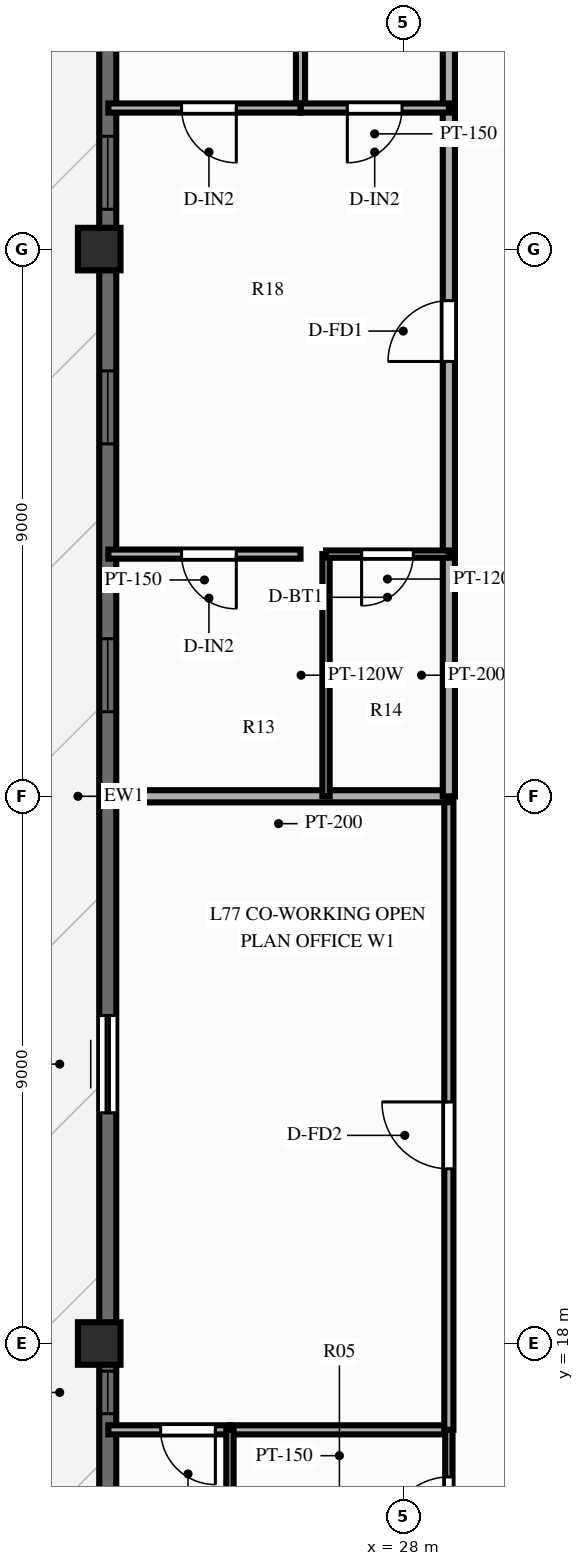
"""IFC4 building model, lengths in metres.
Left out: names, types, materials, properties, quantities, classifications, styles, units other than length and angle.
Written with IfcOpenShell. Run it as: python <this file> out.ifc"""

import sys

from ifc_helpers import new_model, si_unit, direction, frame, frame_2d, origin, origin_2d, place, context, subcontext, project, spatial, rectangle, extrude, source, transform, mapped, element, fill, save


model = new_model("IFC4")
c1 = context("Model", 3, precision=1e-05, world=origin(), true_north=direction((0.0, 1.0)))
c2 = subcontext(c1, "Body", "Model", "MODEL_VIEW")
j1 = project(units=[si_unit("LENGTHUNIT", "METRE"), si_unit("PLANEANGLEUNIT", "RADIAN")], contexts=[c1])
p1 = place(None, origin())
s1 = spatial("IfcSite", under=j1, at=p1, CompositionType="ELEMENT")
p2 = place(p1, origin())
s2 = spatial("IfcBuilding", under=s1, at=p2, CompositionType="ELEMENT")
p3 = place(p2, frame((0.0, 0.0, 249.0)))
s3 = spatial("IfcBuildingStorey", under=s2, at=p3, CompositionType="ELEMENT", Elevation=249.0)
m1 = source(origin(), c2, "Body", "SweptSolid", [
    extrude(rectangle(XDim=0.7, YDim=0.7, at=origin_2d()), origin(), (0.0, 0.0, 1.0), 3.2),
])
for number, where, z_axis, x_axis in (
    (1, (23.0, 36.0, 0.0), (0.0, 0.0, 1.0), (1.0, 0.0, 0.0)),
    (2, (23.0, 18.0, 0.0), (0.0, 0.0, 1.0), (1.0, 0.0, 0.0)),
):
    element("IfcColumn", number, at=place(p3, frame(where, z_axis=z_axis, x_axis=x_axis)), inside=s3, PredefinedType="COLUMN", context=c2, shape_type="MappedRepresentation", body=[
        mapped(m1, transform((0.0, 0.0, 0.0), scale=1.0)),
    ])
p4 = place(p3, frame((23.14, 11.5, 0.0), z_axis=(0.0, 0.0, 1.0), x_axis=(0.0, 1.0, 0.0)))
e3 = element("IfcWall", 3, at=p4, inside=s3, PredefinedType="SOLIDWALL", context=c2, shape_type="SweptSolid", body=[
    extrude(rectangle(XDim=31.0, YDim=0.28, at=frame_2d((15.5, 0.0))), origin(), (0.0, 0.0, 1.0), 2.48),
])
p5 = place(p4, frame((2.035, 0.0, 0.25)))
e4 = element("IfcOpeningElement", 4, at=p5, cuts=e3, PredefinedType="OPENING", context=c2, shape_type="SweptSolid", body=[
    extrude(rectangle(XDim=1.2, YDim=1.5, at=frame_2d((0.6, 0.75))), frame((0.0, 0.152, 0.0), z_axis=(0.0, -1.0, 0.0), x_axis=(1.0, 0.0, 0.0)), (0.0, 0.0, 1.0), 0.304),
])
p6 = place(p4, frame((5.345, 0.0, 0.25)))
e5 = element("IfcOpeningElement", 5, at=p6, cuts=e3, PredefinedType="OPENING", context=c2, shape_type="SweptSolid", body=[
    extrude(rectangle(XDim=0.7, YDim=1.5, at=frame_2d((0.35, 0.75))), frame((0.0, 0.152, 0.0), z_axis=(0.0, -1.0, 0.0), x_axis=(1.0, 0.0, 0.0)), (0.0, 0.0, 1.0), 0.304),
])
p7 = place(p4, frame((10.295, 0.0, 0.0)))
e6 = element("IfcOpeningElement", 6, at=p7, cuts=e3, PredefinedType="OPENING", context=c2, shape_type="SweptSolid", body=[
    extrude(rectangle(XDim=1.6, YDim=2.15, at=frame_2d((0.8, 1.075))), frame((0.0, 0.152, 0.0), z_axis=(0.0, -1.0, 0.0), x_axis=(1.0, 0.0, 0.0)), (0.0, 0.0, 1.0), 0.304),
])
p8 = place(p4, frame((16.892, 0.0, 0.25)))
e7 = element("IfcOpeningElement", 7, at=p8, cuts=e3, PredefinedType="OPENING", context=c2, shape_type="SweptSolid", body=[
    extrude(rectangle(XDim=1.2, YDim=1.5, at=frame_2d((0.6, 0.75))), frame((0.0, 0.152, 0.0), z_axis=(0.0, -1.0, 0.0), x_axis=(1.0, 0.0, 0.0)), (0.0, 0.0, 1.0), 0.304),
])
p9 = place(p4, frame((21.297, 0.0, 0.25)))
e8 = element("IfcOpeningElement", 8, at=p9, cuts=e3, PredefinedType="OPENING", context=c2, shape_type="SweptSolid", body=[
    extrude(rectangle(XDim=1.2, YDim=1.5, at=frame_2d((0.6, 0.75))), frame((0.0, 0.152, 0.0), z_axis=(0.0, -1.0, 0.0), x_axis=(1.0, 0.0, 0.0)), (0.0, 0.0, 1.0), 0.304),
])
p10 = place(p4, frame((25.155, 0.0, 0.25)))
e9 = element("IfcOpeningElement", 9, at=p10, cuts=e3, PredefinedType="OPENING", context=c2, shape_type="SweptSolid", body=[
    extrude(rectangle(XDim=1.2, YDim=1.5, at=frame_2d((0.6, 0.75))), frame((0.0, 0.152, 0.0), z_axis=(0.0, -1.0, 0.0), x_axis=(1.0, 0.0, 0.0)), (0.0, 0.0, 1.0), 0.304),
])
p11 = place(p4, frame((28.215, 0.0, 0.25)))
e10 = element("IfcOpeningElement", 10, at=p11, cuts=e3, PredefinedType="OPENING", context=c2, shape_type="SweptSolid", body=[
    extrude(rectangle(XDim=1.2, YDim=1.5, at=frame_2d((0.6, 0.75))), frame((0.0, 0.152, 0.0), z_axis=(0.0, -1.0, 0.0), x_axis=(1.0, 0.0, 0.0)), (0.0, 0.0, 1.0), 0.304),
])
p12 = place(p3, frame((28.75, 16.58, 0.0), z_axis=(0.0, 0.0, 1.0), x_axis=(-1.0, 0.0, 0.0)))
e11 = element("IfcWall", 11, at=p12, inside=s3, PredefinedType="PARTITIONING", context=c2, shape_type="SweptSolid", body=[
    extrude(rectangle(XDim=3.6, YDim=0.15, at=frame_2d((1.8, 0.0))), origin(), (0.0, 0.0, 1.0), 2.88),
])
p13 = place(p3, frame((25.15, 16.58, 0.0), z_axis=(0.0, 0.0, 1.0), x_axis=(-1.0, 0.0, 0.0)))
e12 = element("IfcWall", 12, at=p13, inside=s3, PredefinedType="PARTITIONING", context=c2, shape_type="SweptSolid", body=[
    extrude(rectangle(XDim=2.0, YDim=0.15, at=frame_2d((1.0, 0.0))), origin(), (0.0, 0.0, 1.0), 2.88),
])
p14 = place(p13, frame((0.24, 0.0, 0.0)))
e13 = element("IfcOpeningElement", 13, at=p14, cuts=e12, PredefinedType="OPENING", context=c2, shape_type="SweptSolid", body=[
    extrude(rectangle(XDim=0.9, YDim=2.1, at=frame_2d((0.45, 1.05))), frame((0.0, 0.087, 0.0), z_axis=(0.0, -1.0, 0.0), x_axis=(1.0, 0.0, 0.0)), (0.0, 0.0, 1.0), 0.174),
])
p15 = place(p3, frame((25.15, 11.68, 0.0), z_axis=(0.0, 0.0, 1.0), x_axis=(0.0, 1.0, 0.0)))
e14 = element("IfcWall", 14, at=p15, inside=s3, PredefinedType="PARTITIONING", context=c2, shape_type="SweptSolid", body=[
    extrude(rectangle(XDim=4.9, YDim=0.12, at=frame_2d((2.45, 0.0))), origin(), (0.0, 0.0, 1.0), 2.88),
])
p16 = place(p3, frame((28.75, 14.03, 0.0), z_axis=(0.0, 0.0, 1.0), x_axis=(0.0, 1.0, 0.0)))
e15 = element("IfcWall", 15, at=p16, inside=s3, PredefinedType="PARTITIONING", context=c2, shape_type="SweptSolid", body=[
    extrude(rectangle(XDim=2.55, YDim=0.12, at=frame_2d((1.275, 0.0))), origin(), (0.0, 0.0, 1.0), 2.88),
])
p17 = place(p16, frame((0.775, 0.0, 0.0)))
e16 = element("IfcOpeningElement", 16, at=p17, cuts=e15, PredefinedType="OPENING", context=c2, shape_type="SweptSolid", body=[
    extrude(rectangle(XDim=1.0, YDim=2.1, at=frame_2d((0.5, 1.05))), frame((0.0, 0.072, 0.0), z_axis=(0.0, -1.0, 0.0), x_axis=(1.0, 0.0, 0.0)), (0.0, 0.0, 1.0), 0.144),
])
p18 = place(p3, frame((28.75, 16.58, 0.0), z_axis=(0.0, 0.0, 1.0), x_axis=(0.0, 1.0, 0.0)))
e17 = element("IfcWall", 17, at=p18, inside=s3, PredefinedType="PARTITIONING", context=c2, shape_type="SweptSolid", body=[
    extrude(rectangle(XDim=10.42, YDim=0.15, at=frame_2d((5.21, 0.0))), origin(), (0.0, 0.0, 1.0), 2.88),
])
p19 = place(p18, frame((4.293, 0.0, 0.0)))
e18 = element("IfcOpeningElement", 18, at=p19, cuts=e17, PredefinedType="OPENING", context=c2, shape_type="SweptSolid", body=[
    extrude(rectangle(XDim=1.1, YDim=2.15, at=frame_2d((0.55, 1.075))), frame((0.0, 0.087, 0.0), z_axis=(0.0, -1.0, 0.0), x_axis=(1.0, 0.0, 0.0)), (0.0, 0.0, 1.0), 0.174),
])
p20 = place(p3, frame((28.75, 27.0, 0.0), z_axis=(0.0, 0.0, 1.0), x_axis=(-1.0, 0.0, 0.0)))
e19 = element("IfcWall", 19, at=p20, inside=s3, PredefinedType="PARTITIONING", context=c2, shape_type="SweptSolid", body=[
    extrude(rectangle(XDim=5.6, YDim=0.2, at=frame_2d((2.8, 0.0))), origin(), (0.0, 0.0, 1.0), 2.88),
])
p21 = place(p3, frame((28.75, 27.0, 0.0), z_axis=(0.0, 0.0, 1.0), x_axis=(0.0, 1.0, 0.0)))
e20 = element("IfcWall", 20, at=p21, inside=s3, PredefinedType="PARTITIONING", context=c2, shape_type="SweptSolid", body=[
    extrude(rectangle(XDim=3.983, YDim=0.2, at=frame_2d((1.992, 0.0))), origin(), (0.0, 0.0, 1.0), 2.88),
])
p22 = place(p3, frame((28.75, 30.983, 0.0), z_axis=(0.0, 0.0, 1.0), x_axis=(0.0, 1.0, 0.0)))
e21 = element("IfcWall", 21, at=p22, inside=s3, PredefinedType="PARTITIONING", context=c2, shape_type="SweptSolid", body=[
    extrude(rectangle(XDim=7.337, YDim=0.2, at=frame_2d((3.668, 0.0))), origin(), (0.0, 0.0, 1.0), 2.88),
])
p23 = place(p22, frame((3.168, 0.0, 0.0)))
e22 = element("IfcOpeningElement", 22, at=p23, cuts=e21, PredefinedType="OPENING", context=c2, shape_type="SweptSolid", body=[
    extrude(rectangle(XDim=1.0, YDim=2.15, at=frame_2d((0.5, 1.075))), frame((0.0, 0.112, 0.0), z_axis=(0.0, -1.0, 0.0), x_axis=(1.0, 0.0, 0.0)), (0.0, 0.0, 1.0), 0.224),
])
p24 = place(p3, frame((28.75, 38.32, 0.0), z_axis=(0.0, 0.0, 1.0), x_axis=(0.0, 1.0, 0.0)))
e23 = element("IfcWall", 23, at=p24, inside=s3, PredefinedType="PARTITIONING", context=c2, shape_type="SweptSolid", body=[
    extrude(rectangle(XDim=4.0, YDim=0.2, at=frame_2d((2.0, 0.0))), origin(), (0.0, 0.0, 1.0), 2.88),
])
p25 = place(p3, frame((26.73, 27.0, 0.0), z_axis=(0.0, 0.0, 1.0), x_axis=(0.0, 1.0, 0.0)))
e24 = element("IfcWall", 24, at=p25, inside=s3, PredefinedType="PARTITIONING", context=c2, shape_type="SweptSolid", body=[
    extrude(rectangle(XDim=3.983, YDim=0.12, at=frame_2d((1.992, 0.0))), origin(), (0.0, 0.0, 1.0), 2.59),
])
p26 = place(p3, frame((26.31, 38.32, 0.0), z_axis=(0.0, 0.0, 1.0), x_axis=(0.0, 1.0, 0.0)))
e25 = element("IfcWall", 25, at=p26, inside=s3, PredefinedType="PARTITIONING", context=c2, shape_type="SweptSolid", body=[
    extrude(rectangle(XDim=4.0, YDim=0.15, at=frame_2d((2.0, 0.0))), origin(), (0.0, 0.0, 1.0), 2.88),
])
p27 = place(p3, frame((28.75, 30.983, 0.0), z_axis=(0.0, 0.0, 1.0), x_axis=(-1.0, 0.0, 0.0)))
e26 = element("IfcWall", 26, at=p27, inside=s3, PredefinedType="PARTITIONING", context=c2, shape_type="SweptSolid", body=[
    extrude(rectangle(XDim=2.02, YDim=0.12, at=frame_2d((1.01, 0.0))), origin(), (0.0, 0.0, 1.0), 2.88),
])
p28 = place(p27, frame((0.585, 0.0, 0.0)))
e27 = element("IfcOpeningElement", 27, at=p28, cuts=e26, PredefinedType="OPENING", context=c2, shape_type="SweptSolid", body=[
    extrude(rectangle(XDim=0.85, YDim=2.05, at=frame_2d((0.425, 1.025))), frame((0.0, 0.072, 0.0), z_axis=(0.0, -1.0, 0.0), x_axis=(1.0, 0.0, 0.0)), (0.0, 0.0, 1.0), 0.144),
])
p29 = place(p3, frame((26.31, 30.983, 0.0), z_axis=(0.0, 0.0, 1.0), x_axis=(-1.0, 0.0, 0.0)))
e28 = element("IfcWall", 28, at=p29, inside=s3, PredefinedType="PARTITIONING", context=c2, shape_type="SweptSolid", body=[
    extrude(rectangle(XDim=3.16, YDim=0.15, at=frame_2d((1.58, 0.0))), origin(), (0.0, 0.0, 1.0), 2.88),
])
p30 = place(p29, frame((1.056, 0.0, 0.0)))
e29 = element("IfcOpeningElement", 29, at=p30, cuts=e28, PredefinedType="OPENING", context=c2, shape_type="SweptSolid", body=[
    extrude(rectangle(XDim=0.9, YDim=2.1, at=frame_2d((0.45, 1.05))), frame((0.0, 0.087, 0.0), z_axis=(0.0, -1.0, 0.0), x_axis=(1.0, 0.0, 0.0)), (0.0, 0.0, 1.0), 0.174),
])
p31 = place(p3, frame((28.75, 38.32, 0.0), z_axis=(0.0, 0.0, 1.0), x_axis=(-1.0, 0.0, 0.0)))
e30 = element("IfcWall", 30, at=p31, inside=s3, PredefinedType="PARTITIONING", context=c2, shape_type="SweptSolid", body=[
    extrude(rectangle(XDim=2.44, YDim=0.15, at=frame_2d((1.22, 0.0))), origin(), (0.0, 0.0, 1.0), 2.88),
])
p32 = place(p31, frame((0.77, 0.0, 0.0)))
e31 = element("IfcOpeningElement", 31, at=p32, cuts=e30, PredefinedType="OPENING", context=c2, shape_type="SweptSolid", body=[
    extrude(rectangle(XDim=0.9, YDim=2.1, at=frame_2d((0.45, 1.05))), frame((0.0, 0.087, 0.0), z_axis=(0.0, -1.0, 0.0), x_axis=(1.0, 0.0, 0.0)), (0.0, 0.0, 1.0), 0.174),
])
p33 = place(p3, frame((26.31, 38.32, 0.0), z_axis=(0.0, 0.0, 1.0), x_axis=(-1.0, 0.0, 0.0)))
e32 = element("IfcWall", 32, at=p33, inside=s3, PredefinedType="PARTITIONING", context=c2, shape_type="SweptSolid", body=[
    extrude(rectangle(XDim=3.16, YDim=0.15, at=frame_2d((1.58, 0.0))), origin(), (0.0, 0.0, 1.0), 2.88),
])
p34 = place(p33, frame((1.056, 0.0, 0.0)))
e33 = element("IfcOpeningElement", 33, at=p34, cuts=e32, PredefinedType="OPENING", context=c2, shape_type="SweptSolid", body=[
    extrude(rectangle(XDim=0.9, YDim=2.1, at=frame_2d((0.45, 1.05))), frame((0.0, 0.087, 0.0), z_axis=(0.0, -1.0, 0.0), x_axis=(1.0, 0.0, 0.0)), (0.0, 0.0, 1.0), 0.174),
])
m2 = source(origin(), c2, "Body", "SweptSolid", [
    extrude(rectangle(XDim=0.7, YDim=1.5, at=frame_2d((0.35, 0.75))), frame((0.0, 0.03, 0.0), z_axis=(0.0, -1.0, 0.0), x_axis=(1.0, 0.0, 0.0)), (0.0, 0.0, 1.0), 0.06),
])
p35 = place(p6, origin())
e34 = element("IfcWindow", 34, at=p35, inside=s3, PartitioningType="SINGLE_PANEL", PredefinedType="WINDOW", context=c2, shape_type="MappedRepresentation", body=[
    mapped(m2, transform((0.0, 0.0, 0.0), scale=1.0)),
])
fill(e5, e34)
m3 = source(origin(), c2, "Body", "SweptSolid", [
    extrude(rectangle(XDim=1.6, YDim=2.15, at=frame_2d((0.8, 1.075))), frame((0.0, 0.025, 0.0), z_axis=(0.0, -1.0, 0.0), x_axis=(1.0, 0.0, 0.0)), (0.0, 0.0, 1.0), 0.05),
])
p36 = place(p7, origin())
e35 = element("IfcDoor", 35, at=p36, inside=s3, OperationType="SLIDING_TO_LEFT", PredefinedType="DOOR", context=c2, shape_type="MappedRepresentation", body=[
    mapped(m3, transform((0.0, 0.0, 0.0), scale=1.0)),
])
fill(e6, e35)
m4 = source(origin(), c2, "Body", "SweptSolid", [
    extrude(rectangle(XDim=1.2, YDim=1.5, at=frame_2d((0.6, 0.75))), frame((0.0, 0.03, 0.0), z_axis=(0.0, -1.0, 0.0), x_axis=(1.0, 0.0, 0.0)), (0.0, 0.0, 1.0), 0.06),
])
p37 = place(p8, origin())
e36 = element("IfcWindow", 36, at=p37, inside=s3, PartitioningType="SINGLE_PANEL", PredefinedType="WINDOW", context=c2, shape_type="MappedRepresentation", body=[
    mapped(m4, transform((0.0, 0.0, 0.0), scale=1.0)),
])
fill(e7, e36)
p38 = place(p9, origin())
e37 = element("IfcWindow", 37, at=p38, inside=s3, PartitioningType="SINGLE_PANEL", PredefinedType="WINDOW", context=c2, shape_type="MappedRepresentation", body=[
    mapped(m4, transform((0.0, 0.0, 0.0), scale=1.0)),
])
fill(e8, e37)
p39 = place(p10, origin())
e38 = element("IfcWindow", 38, at=p39, inside=s3, PartitioningType="SINGLE_PANEL", PredefinedType="WINDOW", context=c2, shape_type="MappedRepresentation", body=[
    mapped(m4, transform((0.0, 0.0, 0.0), scale=1.0)),
])
fill(e9, e38)
m5 = source(origin(), c2, "Body", "SweptSolid", [
    extrude(rectangle(XDim=0.9, YDim=2.1, at=frame_2d((0.45, 1.05))), frame((0.0, 0.025, 0.0), z_axis=(0.0, -1.0, 0.0), x_axis=(1.0, 0.0, 0.0)), (0.0, 0.0, 1.0), 0.05),
])
p40 = place(p14, origin())
e39 = element("IfcDoor", 39, at=p40, inside=s3, OperationType="SINGLE_SWING_LEFT", PredefinedType="DOOR", context=c2, shape_type="MappedRepresentation", body=[
    mapped(m5, transform((0.0, 0.0, 0.0), scale=1.0)),
])
fill(e13, e39)
m6 = source(origin(), c2, "Body", "SweptSolid", [
    extrude(rectangle(XDim=1.0, YDim=2.1, at=frame_2d((0.5, 1.05))), frame((0.0, 0.025, 0.0), z_axis=(0.0, -1.0, 0.0), x_axis=(1.0, 0.0, 0.0)), (0.0, 0.0, 1.0), 0.05),
])
p41 = place(p17, origin())
e40 = element("IfcDoor", 40, at=p41, inside=s3, OperationType="SINGLE_SWING_LEFT", PredefinedType="DOOR", context=c2, shape_type="MappedRepresentation", body=[
    mapped(m6, transform((0.0, 0.0, 0.0), scale=1.0)),
])
fill(e16, e40)
m7 = source(origin(), c2, "Body", "SweptSolid", [
    extrude(rectangle(XDim=1.1, YDim=2.15, at=frame_2d((0.55, 1.075))), frame((0.0, 0.025, 0.0), z_axis=(0.0, -1.0, 0.0), x_axis=(1.0, 0.0, 0.0)), (0.0, 0.0, 1.0), 0.05),
])
p42 = place(p19, origin())
e41 = element("IfcDoor", 41, at=p42, inside=s3, OperationType="SINGLE_SWING_RIGHT", PredefinedType="DOOR", context=c2, shape_type="MappedRepresentation", body=[
    mapped(m7, transform((0.0, 0.0, 0.0), scale=1.0)),
])
fill(e18, e41)
m8 = source(origin(), c2, "Body", "SweptSolid", [
    extrude(rectangle(XDim=1.0, YDim=2.15, at=frame_2d((0.5, 1.075))), frame((0.0, 0.025, 0.0), z_axis=(0.0, -1.0, 0.0), x_axis=(1.0, 0.0, 0.0)), (0.0, 0.0, 1.0), 0.05),
])
p43 = place(p23, origin())
e42 = element("IfcDoor", 42, at=p43, inside=s3, OperationType="SINGLE_SWING_LEFT", PredefinedType="DOOR", context=c2, shape_type="MappedRepresentation", body=[
    mapped(m8, transform((0.0, 0.0, 0.0), scale=1.0)),
])
fill(e22, e42)
m9 = source(origin(), c2, "Body", "SweptSolid", [
    extrude(rectangle(XDim=0.85, YDim=2.05, at=frame_2d((0.425, 1.025))), frame((0.0, 0.025, 0.0), z_axis=(0.0, -1.0, 0.0), x_axis=(1.0, 0.0, 0.0)), (0.0, 0.0, 1.0), 0.05),
])
p44 = place(p28, origin())
e43 = element("IfcDoor", 43, at=p44, inside=s3, OperationType="SINGLE_SWING_RIGHT", PredefinedType="DOOR", context=c2, shape_type="MappedRepresentation", body=[
    mapped(m9, transform((0.0, 0.0, 0.0), scale=1.0)),
])
fill(e27, e43)
p45 = place(p30, origin())
e44 = element("IfcDoor", 44, at=p45, inside=s3, OperationType="SINGLE_SWING_LEFT", PredefinedType="DOOR", context=c2, shape_type="MappedRepresentation", body=[
    mapped(m5, transform((0.0, 0.0, 0.0), scale=1.0)),
])
fill(e29, e44)
p46 = place(p32, origin())
e45 = element("IfcDoor", 45, at=p46, inside=s3, OperationType="SINGLE_SWING_RIGHT", PredefinedType="DOOR", context=c2, shape_type="MappedRepresentation", body=[
    mapped(m5, transform((0.0, 0.0, 0.0), scale=1.0)),
])
fill(e31, e45)
p47 = place(p34, origin())
e46 = element("IfcDoor", 46, at=p47, inside=s3, OperationType="SINGLE_SWING_LEFT", PredefinedType="DOOR", context=c2, shape_type="MappedRepresentation", body=[
    mapped(m5, transform((0.0, 0.0, 0.0), scale=1.0)),
])
fill(e33, e46)
save(model, sys.argv[1])
